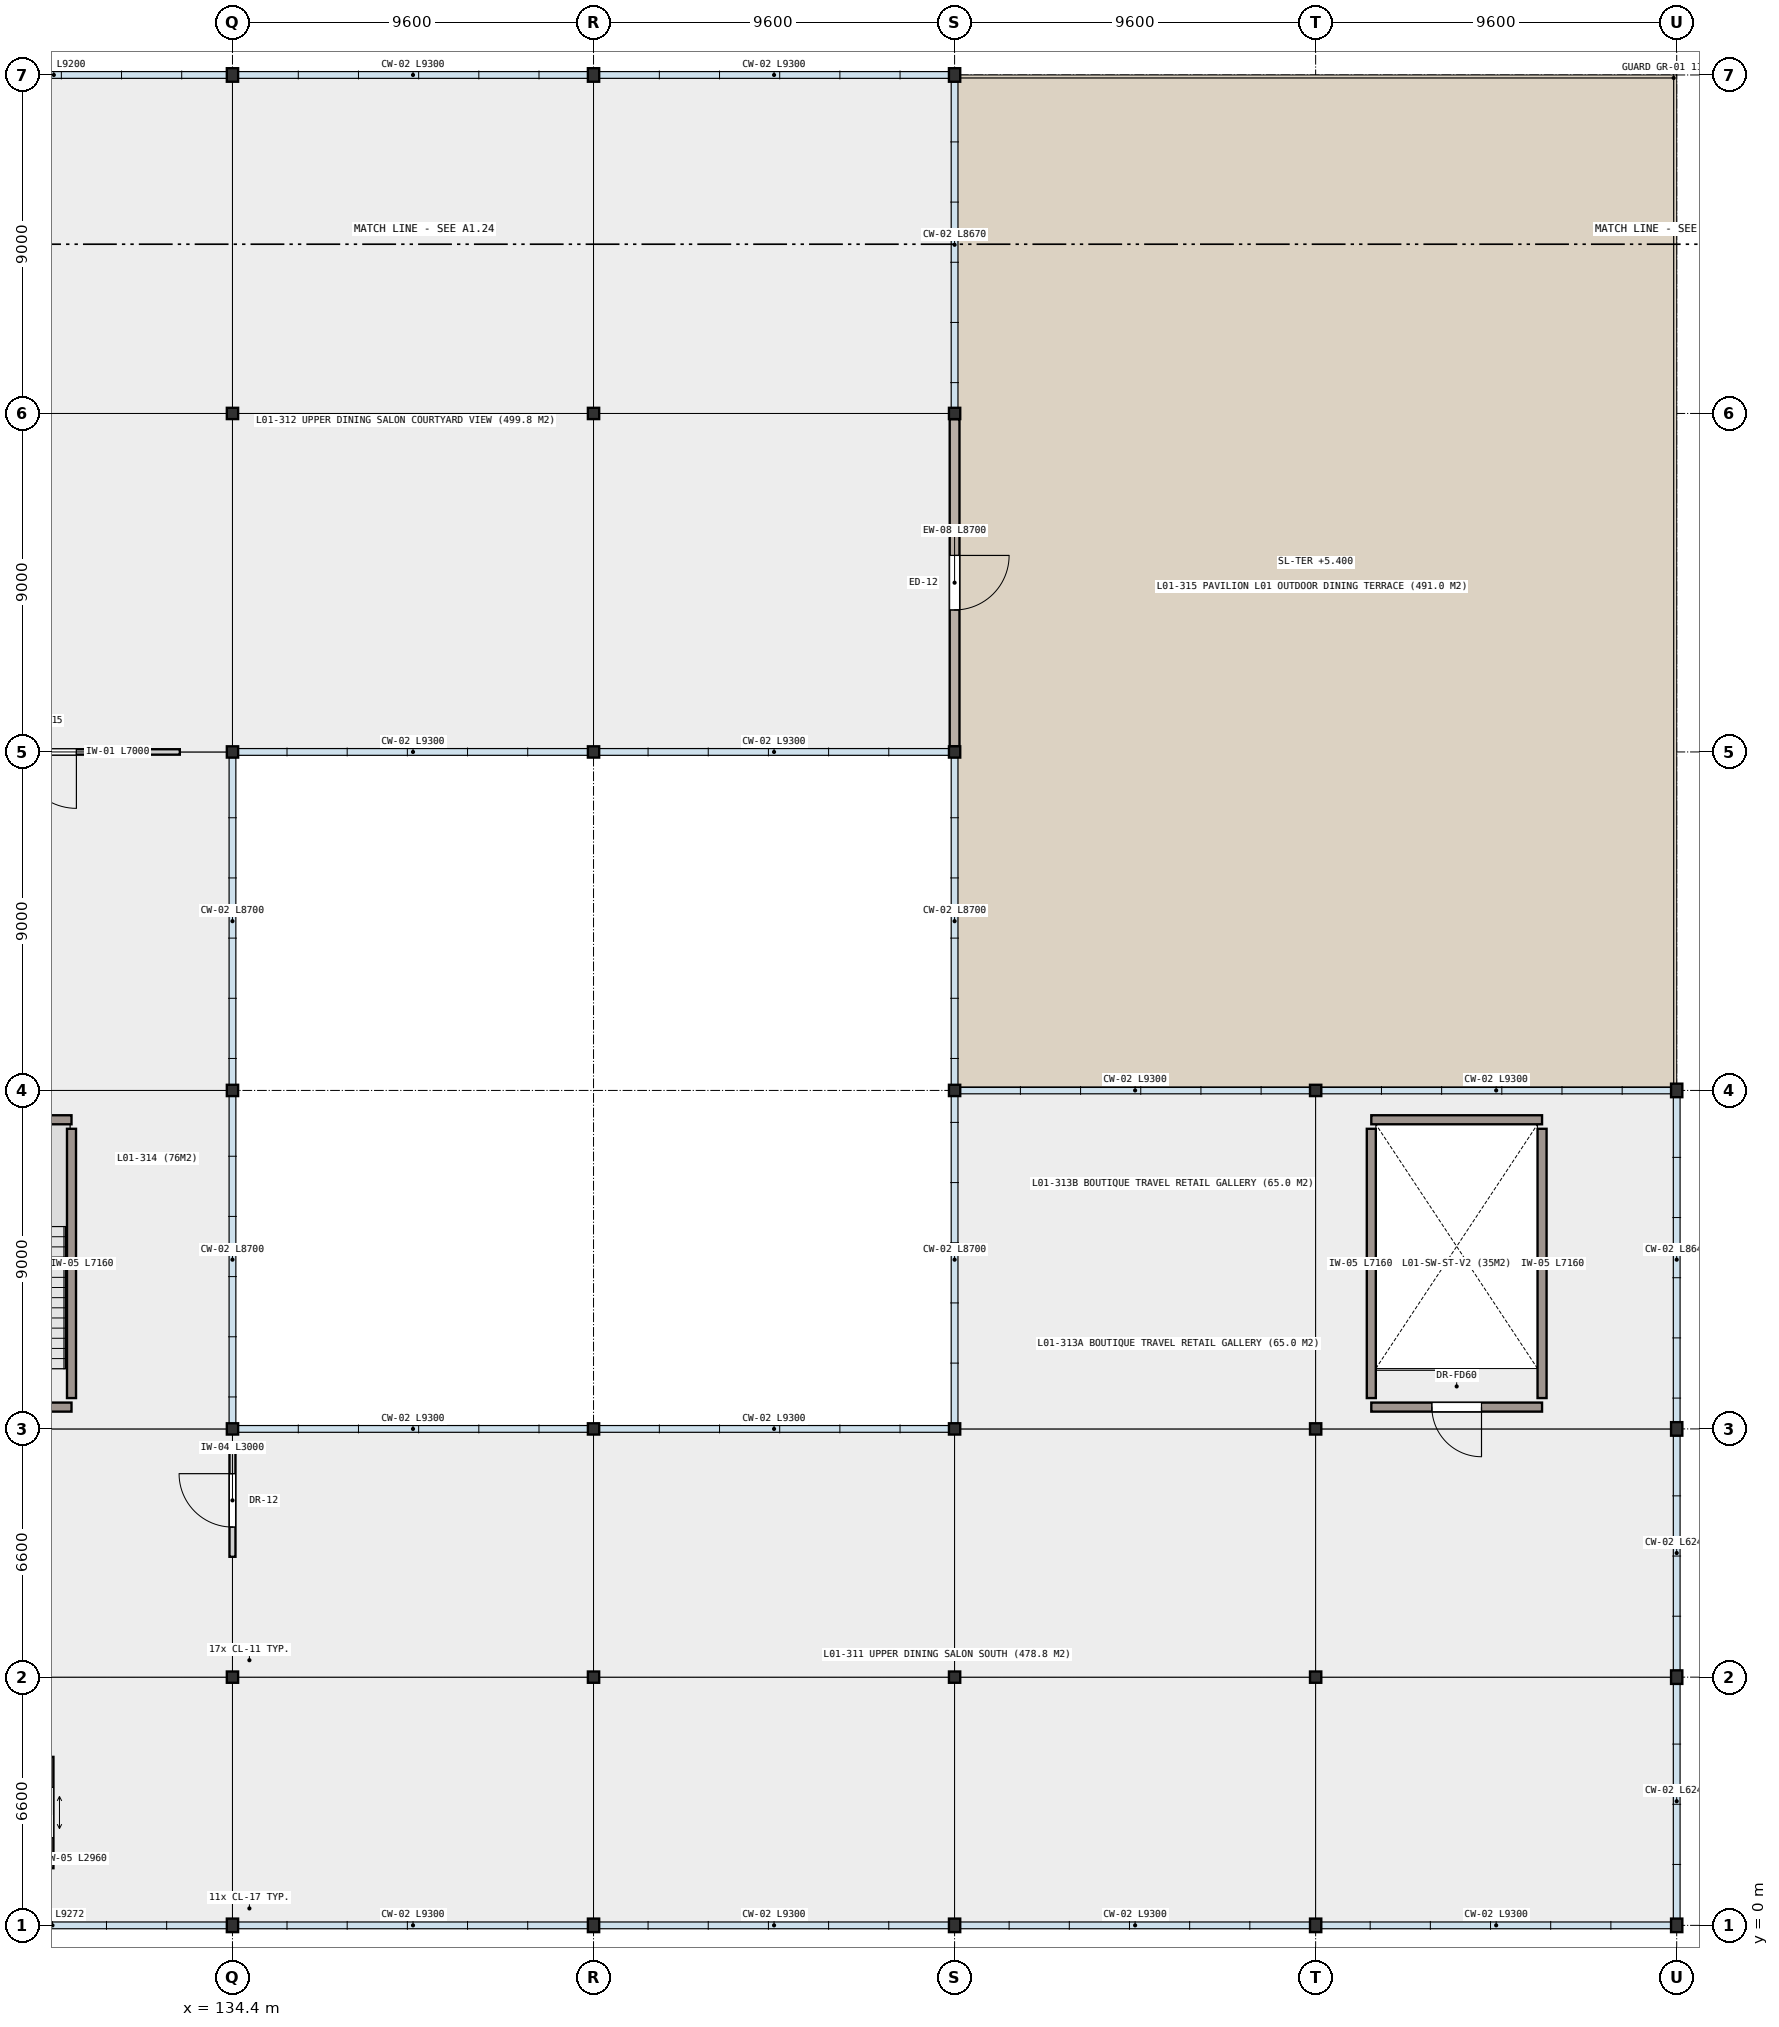
"""IFC4 building model, lengths in metres.
Left out: names, types, materials, properties, quantities, classifications, styles, units other than length and angle.
Written with IfcOpenShell. Run it as: python <this file> out.ifc"""

import sys

from ifc_helpers import new_model, si_unit, direction, frame, frame_2d, origin, origin_2d, place, context, subcontext, project, spatial, rectangle, i_section, extrude, element, fill, save


model = new_model("IFC4")
c1 = context("Model", 3, precision=1e-05, world=origin(), true_north=direction((0.0, 1.0)))
c2 = subcontext(c1, "Body", "Model", "MODEL_VIEW")
j1 = project(units=[si_unit("LENGTHUNIT", "METRE"), si_unit("PLANEANGLEUNIT", "RADIAN")], contexts=[c1])
p1 = place(None, origin())
s1 = spatial("IfcSite", under=j1, at=p1, CompositionType="ELEMENT")
p2 = place(p1, origin())
s2 = spatial("IfcBuilding", under=s1, at=p2, CompositionType="ELEMENT")
p3 = place(p2, frame((0.0, 0.0, 5.4)))
s3 = spatial("IfcBuildingStorey", under=s2, at=p3, CompositionType="ELEMENT", Elevation=5.4)
p4 = place(p3, frame((134.4, 0.0, 0.0), z_axis=(0.0, 0.0, 1.0), x_axis=(1.0, 0.0, 0.0)))
e1 = element("IfcColumn", 1, at=p4, inside=s3, PredefinedType="COLUMN", context=c2, shape_type="SweptSolid", body=[
    extrude(i_section(OverallWidth=0.3, OverallDepth=0.36, WebThickness=0.012, FlangeThickness=0.022, FilletRadius=0.027, at=origin_2d()), origin(), (0.0, 0.0, 1.0), 4.8),
])
for number, where, z_axis, x_axis in (
    (2, (134.4, 6.6, 0.0), (0.0, 0.0, 1.0), (1.0, 0.0, 0.0)),
    (3, (134.4, 13.2, 0.0), (0.0, 0.0, 1.0), (1.0, 0.0, 0.0)),
    (4, (134.4, 22.2, 0.0), (0.0, 0.0, 1.0), (1.0, 0.0, 0.0)),
    (5, (134.4, 31.2, 0.0), (0.0, 0.0, 1.0), (1.0, 0.0, 0.0)),
    (6, (134.4, 40.2, 0.0), (0.0, 0.0, 1.0), (1.0, 0.0, 0.0)),
):
    element("IfcColumn", number, at=place(p3, frame(where, z_axis=z_axis, x_axis=x_axis)), inside=s3, PredefinedType="COLUMN", context=c2, shape_type="SweptSolid", body=[
        extrude(i_section(OverallWidth=0.3, OverallDepth=0.3, WebThickness=0.011, FlangeThickness=0.019, FilletRadius=0.027, at=origin_2d()), origin(), (0.0, 0.0, 1.0), 4.8),
    ])
for number, where, z_axis, x_axis in (
    (7, (134.4, 49.2, 0.0), (0.0, 0.0, 1.0), (1.0, 0.0, 0.0)),
    (8, (144.0, 0.0, 0.0), (0.0, 0.0, 1.0), (1.0, 0.0, 0.0)),
):
    element("IfcColumn", number, at=place(p3, frame(where, z_axis=z_axis, x_axis=x_axis)), inside=s3, PredefinedType="COLUMN", context=c2, shape_type="SweptSolid", body=[
        extrude(i_section(OverallWidth=0.3, OverallDepth=0.36, WebThickness=0.012, FlangeThickness=0.022, FilletRadius=0.027, at=origin_2d()), origin(), (0.0, 0.0, 1.0), 4.8),
    ])
for number, where, z_axis, x_axis in (
    (9, (144.0, 6.6, 0.0), (0.0, 0.0, 1.0), (1.0, 0.0, 0.0)),
    (10, (144.0, 13.2, 0.0), (0.0, 0.0, 1.0), (1.0, 0.0, 0.0)),
    (11, (144.0, 31.2, 0.0), (0.0, 0.0, 1.0), (1.0, 0.0, 0.0)),
    (12, (144.0, 40.2, 0.0), (0.0, 0.0, 1.0), (1.0, 0.0, 0.0)),
):
    element("IfcColumn", number, at=place(p3, frame(where, z_axis=z_axis, x_axis=x_axis)), inside=s3, PredefinedType="COLUMN", context=c2, shape_type="SweptSolid", body=[
        extrude(i_section(OverallWidth=0.3, OverallDepth=0.3, WebThickness=0.011, FlangeThickness=0.019, FilletRadius=0.027, at=origin_2d()), origin(), (0.0, 0.0, 1.0), 4.8),
    ])
for number, where, z_axis, x_axis in (
    (13, (144.0, 49.2, 0.0), (0.0, 0.0, 1.0), (1.0, 0.0, 0.0)),
    (14, (153.6, 0.0, 0.0), (0.0, 0.0, 1.0), (1.0, 0.0, 0.0)),
):
    element("IfcColumn", number, at=place(p3, frame(where, z_axis=z_axis, x_axis=x_axis)), inside=s3, PredefinedType="COLUMN", context=c2, shape_type="SweptSolid", body=[
        extrude(i_section(OverallWidth=0.3, OverallDepth=0.36, WebThickness=0.012, FlangeThickness=0.022, FilletRadius=0.027, at=origin_2d()), origin(), (0.0, 0.0, 1.0), 4.8),
    ])
for number, where, z_axis, x_axis in (
    (15, (153.6, 6.6, 0.0), (0.0, 0.0, 1.0), (1.0, 0.0, 0.0)),
    (16, (153.6, 13.2, 0.0), (0.0, 0.0, 1.0), (1.0, 0.0, 0.0)),
    (17, (153.6, 22.2, 0.0), (0.0, 0.0, 1.0), (1.0, 0.0, 0.0)),
    (18, (153.6, 31.2, 0.0), (0.0, 0.0, 1.0), (1.0, 0.0, 0.0)),
    (19, (153.6, 40.2, 0.0), (0.0, 0.0, 1.0), (1.0, 0.0, 0.0)),
):
    element("IfcColumn", number, at=place(p3, frame(where, z_axis=z_axis, x_axis=x_axis)), inside=s3, PredefinedType="COLUMN", context=c2, shape_type="SweptSolid", body=[
        extrude(i_section(OverallWidth=0.3, OverallDepth=0.3, WebThickness=0.011, FlangeThickness=0.019, FilletRadius=0.027, at=origin_2d()), origin(), (0.0, 0.0, 1.0), 4.8),
    ])
for number, where, z_axis, x_axis in (
    (20, (153.6, 49.2, 0.0), (0.0, 0.0, 1.0), (1.0, 0.0, 0.0)),
    (21, (163.2, 0.0, 0.0), (0.0, 0.0, 1.0), (1.0, 0.0, 0.0)),
):
    element("IfcColumn", number, at=place(p3, frame(where, z_axis=z_axis, x_axis=x_axis)), inside=s3, PredefinedType="COLUMN", context=c2, shape_type="SweptSolid", body=[
        extrude(i_section(OverallWidth=0.3, OverallDepth=0.36, WebThickness=0.012, FlangeThickness=0.022, FilletRadius=0.027, at=origin_2d()), origin(), (0.0, 0.0, 1.0), 4.8),
    ])
for number, where, z_axis, x_axis in (
    (22, (163.2, 6.6, 0.0), (0.0, 0.0, 1.0), (1.0, 0.0, 0.0)),
    (23, (163.2, 13.2, 0.0), (0.0, 0.0, 1.0), (1.0, 0.0, 0.0)),
    (24, (163.2, 22.2, 0.0), (0.0, 0.0, 1.0), (1.0, 0.0, 0.0)),
):
    element("IfcColumn", number, at=place(p3, frame(where, z_axis=z_axis, x_axis=x_axis)), inside=s3, PredefinedType="COLUMN", context=c2, shape_type="SweptSolid", body=[
        extrude(i_section(OverallWidth=0.3, OverallDepth=0.3, WebThickness=0.011, FlangeThickness=0.019, FilletRadius=0.027, at=origin_2d()), origin(), (0.0, 0.0, 1.0), 4.8),
    ])
for number, where, z_axis, x_axis in (
    (25, (172.8, 0.0, 0.0), (0.0, 0.0, 1.0), (1.0, 0.0, 0.0)),
    (26, (172.8, 6.6, 0.0), (0.0, 0.0, 1.0), (1.0, 0.0, 0.0)),
    (27, (172.8, 13.2, 0.0), (0.0, 0.0, 1.0), (1.0, 0.0, 0.0)),
    (28, (172.8, 22.2, 0.0), (0.0, 0.0, 1.0), (1.0, 0.0, 0.0)),
):
    element("IfcColumn", number, at=place(p3, frame(where, z_axis=z_axis, x_axis=x_axis)), inside=s3, PredefinedType="COLUMN", context=c2, shape_type="SweptSolid", body=[
        extrude(i_section(OverallWidth=0.3, OverallDepth=0.36, WebThickness=0.012, FlangeThickness=0.022, FilletRadius=0.027, at=origin_2d()), origin(), (0.0, 0.0, 1.0), 4.8),
    ])
p5 = place(p3, frame((153.6, 40.05, 0.0), z_axis=(0.0, 0.0, 1.0), x_axis=(0.0, -1.0, 0.0)))
e29 = element("IfcWall", 29, at=p5, inside=s3, PredefinedType="SOLIDWALL", context=c2, shape_type="SweptSolid", body=[
    extrude(rectangle(XDim=8.7, YDim=0.26, at=frame_2d((4.35, 0.0))), origin(), (0.0, 0.0, 1.0), 4.17),
])
p6 = place(p5, frame((3.625, 0.0, 0.0)))
e30 = element("IfcOpeningElement", 30, at=p6, cuts=e29, PredefinedType="OPENING", context=c2, shape_type="SweptSolid", body=[
    extrude(rectangle(XDim=1.45, YDim=2.2, at=frame_2d((0.725, 1.1))), frame((0.0, 0.14, 0.0), z_axis=(0.0, -1.0, 0.0), x_axis=(1.0, 0.0, 0.0)), (0.0, 0.0, 1.0), 0.28),
])
p7 = place(p3, frame((129.52, 4.48, 0.0), z_axis=(0.0, 0.0, 1.0), x_axis=(0.0, -1.0, 0.0)))
e31 = element("IfcWall", 31, at=p7, inside=s3, PredefinedType="SHEAR", context=c2, shape_type="SweptSolid", body=[
    extrude(rectangle(XDim=2.96, YDim=0.24, at=frame_2d((1.48, 0.0))), origin(), (0.0, 0.0, 1.0), 4.54),
])
p8 = place(p7, frame((0.81, 0.0, 0.0)))
e32 = element("IfcOpeningElement", 32, at=p8, cuts=e31, PredefinedType="OPENING", context=c2, shape_type="SweptSolid", body=[
    extrude(rectangle(XDim=1.34, YDim=2.18, at=frame_2d((0.67, 1.09))), frame((0.0, 0.13, 0.0), z_axis=(0.0, -1.0, 0.0), x_axis=(1.0, 0.0, 0.0)), (0.0, 0.0, 1.0), 0.26),
])
p9 = place(p3, frame((130.12, 13.78, 0.0), z_axis=(0.0, 0.0, 1.0), x_axis=(-1.0, 0.0, 0.0)))
e33 = element("IfcWall", 33, at=p9, inside=s3, PredefinedType="SHEAR", context=c2, shape_type="SweptSolid", body=[
    extrude(rectangle(XDim=4.54, YDim=0.24, at=frame_2d((2.27, 0.0))), origin(), (0.0, 0.0, 1.0), 4.54),
])
p10 = place(p9, frame((1.61, 0.0, 0.0)))
e34 = element("IfcOpeningElement", 34, at=p10, cuts=e33, PredefinedType="OPENING", context=c2, shape_type="SweptSolid", body=[
    extrude(rectangle(XDim=1.32, YDim=2.15, at=frame_2d((0.66, 1.075))), frame((0.0, 0.13, 0.0), z_axis=(0.0, -1.0, 0.0), x_axis=(1.0, 0.0, 0.0)), (0.0, 0.0, 1.0), 0.26),
])
p11 = place(p3, frame((125.58, 21.42, 0.0), z_axis=(0.0, 0.0, 1.0), x_axis=(1.0, 0.0, 0.0)))
e35 = element("IfcWall", 35, at=p11, inside=s3, PredefinedType="SHEAR", context=c2, shape_type="SweptSolid", body=[
    extrude(rectangle(XDim=4.54, YDim=0.24, at=frame_2d((2.27, 0.0))), origin(), (0.0, 0.0, 1.0), 4.54),
])
p12 = place(p3, frame((130.12, 21.18, 0.0), z_axis=(0.0, 0.0, 1.0), x_axis=(0.0, -1.0, 0.0)))
e36 = element("IfcWall", 36, at=p12, inside=s3, PredefinedType="SHEAR", context=c2, shape_type="SweptSolid", body=[
    extrude(rectangle(XDim=7.16, YDim=0.24, at=frame_2d((3.58, 0.0))), origin(), (0.0, 0.0, 1.0), 4.54),
])
p13 = place(p3, frame((169.22, 13.78, 0.0), z_axis=(0.0, 0.0, 1.0), x_axis=(-1.0, 0.0, 0.0)))
e37 = element("IfcWall", 37, at=p13, inside=s3, PredefinedType="SHEAR", context=c2, shape_type="SweptSolid", body=[
    extrude(rectangle(XDim=4.54, YDim=0.24, at=frame_2d((2.27, 0.0))), origin(), (0.0, 0.0, 1.0), 4.54),
])
p14 = place(p13, frame((1.61, 0.0, 0.0)))
e38 = element("IfcOpeningElement", 38, at=p14, cuts=e37, PredefinedType="OPENING", context=c2, shape_type="SweptSolid", body=[
    extrude(rectangle(XDim=1.32, YDim=2.15, at=frame_2d((0.66, 1.075))), frame((0.0, 0.13, 0.0), z_axis=(0.0, -1.0, 0.0), x_axis=(1.0, 0.0, 0.0)), (0.0, 0.0, 1.0), 0.26),
])
p15 = place(p3, frame((164.68, 21.42, 0.0), z_axis=(0.0, 0.0, 1.0), x_axis=(1.0, 0.0, 0.0)))
e39 = element("IfcWall", 39, at=p15, inside=s3, PredefinedType="SHEAR", context=c2, shape_type="SweptSolid", body=[
    extrude(rectangle(XDim=4.54, YDim=0.24, at=frame_2d((2.27, 0.0))), origin(), (0.0, 0.0, 1.0), 4.54),
])
for number, where, z_axis, x_axis in (
    (40, (164.68, 14.02, 0.0), (0.0, 0.0, 1.0), (0.0, 1.0, 0.0)),
    (41, (169.22, 21.18, 0.0), (0.0, 0.0, 1.0), (0.0, -1.0, 0.0)),
):
    element("IfcWall", number, at=place(p3, frame(where, z_axis=z_axis, x_axis=x_axis)), inside=s3, PredefinedType="SHEAR", context=c2, shape_type="SweptSolid", body=[
        extrude(rectangle(XDim=7.16, YDim=0.24, at=frame_2d((3.58, 0.0))), origin(), (0.0, 0.0, 1.0), 4.54),
    ])
p16 = place(p3, frame((134.4, 9.8, 0.0), z_axis=(0.0, 0.0, 1.0), x_axis=(0.0, 1.0, 0.0)))
e42 = element("IfcWall", 42, at=p16, inside=s3, PredefinedType="PARTITIONING", context=c2, shape_type="SweptSolid", body=[
    extrude(rectangle(XDim=3.0, YDim=0.16, at=frame_2d((1.5, 0.0))), origin(), (0.0, 0.0, 1.0), 4.01),
])
p17 = place(p16, frame((0.79, 0.0, 0.0)))
e43 = element("IfcOpeningElement", 43, at=p17, cuts=e42, PredefinedType="OPENING", context=c2, shape_type="SweptSolid", body=[
    extrude(rectangle(XDim=1.42, YDim=2.18, at=frame_2d((0.71, 1.09))), frame((0.0, 0.09, 0.0), z_axis=(0.0, -1.0, 0.0), x_axis=(1.0, 0.0, 0.0)), (0.0, 0.0, 1.0), 0.18),
])
p18 = place(p3, frame((133.0, 31.2, 0.0), z_axis=(0.0, 0.0, 1.0), x_axis=(-1.0, 0.0, 0.0)))
e44 = element("IfcWall", 44, at=p18, inside=s3, PredefinedType="PARTITIONING", context=c2, shape_type="SweptSolid", body=[
    extrude(rectangle(XDim=7.0, YDim=0.145, at=frame_2d((3.5, 0.0))), origin(), (0.0, 0.0, 1.0), 3.91),
])
p19 = place(p18, frame((2.75, 0.0, 0.0)))
e45 = element("IfcOpeningElement", 45, at=p19, cuts=e44, PredefinedType="OPENING", context=c2, shape_type="SweptSolid", body=[
    extrude(rectangle(XDim=1.5, YDim=2.2, at=frame_2d((0.75, 1.1))), frame((0.0, 0.083, 0.0), z_axis=(0.0, -1.0, 0.0), x_axis=(1.0, 0.0, 0.0)), (0.0, 0.0, 1.0), 0.165),
])
p20 = place(p6, origin())
e46 = element("IfcDoor", 46, at=p20, inside=s3, OperationType="SINGLE_SWING_LEFT", PredefinedType="DOOR", context=c2, shape_type="SweptSolid", body=[
    extrude(rectangle(XDim=1.45, YDim=2.2, at=frame_2d((0.725, 1.1))), frame((0.0, 0.025, 0.0), z_axis=(0.0, -1.0, 0.0), x_axis=(1.0, 0.0, 0.0)), (0.0, 0.0, 1.0), 0.05),
])
fill(e30, e46)
p21 = place(p14, origin())
e47 = element("IfcDoor", 47, at=p21, inside=s3, OperationType="SINGLE_SWING_LEFT", PredefinedType="DOOR", context=c2, shape_type="SweptSolid", body=[
    extrude(rectangle(XDim=1.32, YDim=2.15, at=frame_2d((0.66, 1.075))), frame((0.0, 0.025, 0.0), z_axis=(0.0, -1.0, 0.0), x_axis=(1.0, 0.0, 0.0)), (0.0, 0.0, 1.0), 0.05),
])
fill(e38, e47)
p22 = place(p17, origin())
e48 = element("IfcDoor", 48, at=p22, inside=s3, OperationType="SINGLE_SWING_RIGHT", PredefinedType="DOOR", context=c2, shape_type="SweptSolid", body=[
    extrude(rectangle(XDim=1.42, YDim=2.18, at=frame_2d((0.71, 1.09))), frame((0.0, 0.025, 0.0), z_axis=(0.0, -1.0, 0.0), x_axis=(1.0, 0.0, 0.0)), (0.0, 0.0, 1.0), 0.05),
])
fill(e43, e48)
p23 = place(p19, origin())
e49 = element("IfcDoor", 49, at=p23, inside=s3, OperationType="SINGLE_SWING_LEFT", PredefinedType="DOOR", context=c2, shape_type="SweptSolid", body=[
    extrude(rectangle(XDim=1.5, YDim=2.2, at=frame_2d((0.75, 1.1))), frame((0.0, 0.025, 0.0), z_axis=(0.0, -1.0, 0.0), x_axis=(1.0, 0.0, 0.0)), (0.0, 0.0, 1.0), 0.05),
])
fill(e45, e49)
save(model, sys.argv[1])
